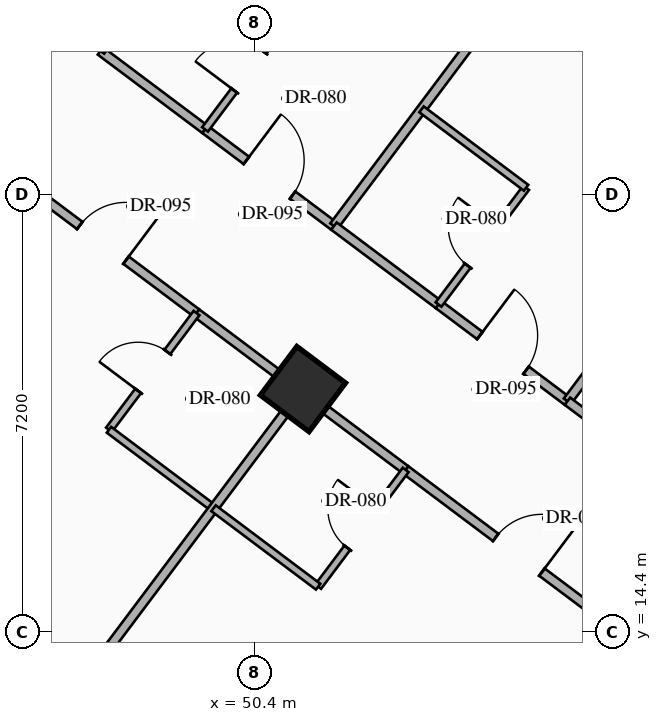
"""IFC4 building model, lengths in metres.
Left out: names, types, materials, properties, quantities, classifications, styles, units other than length and angle.
Written with IfcOpenShell. Run it as: python <this file> out.ifc"""

import sys

from ifc_helpers import new_model, si_unit, direction, frame, frame_2d, origin, origin_2d, place, context, subcontext, project, spatial, rectangle, hollow_rectangle, extrude, element, fill, save


model = new_model("IFC4")
c1 = context("Model", 3, precision=1e-05, world=origin(), true_north=direction((0.0, 1.0)))
c2 = subcontext(c1, "Body", "Model", "MODEL_VIEW")
j1 = project(units=[si_unit("LENGTHUNIT", "METRE"), si_unit("PLANEANGLEUNIT", "RADIAN")], contexts=[c1])
p1 = place(None, origin())
s1 = spatial("IfcSite", under=j1, at=p1, CompositionType="ELEMENT")
p2 = place(p1, origin())
s2 = spatial("IfcBuilding", under=s1, at=p2, CompositionType="ELEMENT")
p3 = place(p2, frame((0.0, 0.0, 36.6)))
s3 = spatial("IfcBuildingStorey", under=s2, at=p3, CompositionType="ELEMENT", Elevation=36.6)
p4 = place(p3, frame((51.2, 18.4, 0.0), z_axis=(0.0, 0.0, 1.0), x_axis=(0.799999996291, -0.600000004945, 0.0)))
e1 = element("IfcColumn", 1, at=p4, inside=s3, PredefinedType="COLUMN", context=c2, shape_type="SweptSolid", body=[
    extrude(hollow_rectangle(XDim=1.0, YDim=1.0, WallThickness=0.038, at=origin_2d()), origin(), (0.0, 0.0, 1.0), 3.35),
])
p5 = place(p3, frame((44.86, 40.73, 0.0), z_axis=(0.0, 0.0, 1.0), x_axis=(0.800006902154, -0.599990797017, 0.0)))
e2 = element("IfcWall", 2, at=p5, inside=s3, PredefinedType="STANDARD", context=c2, shape_type="SweptSolid", body=[
    extrude(rectangle(XDim=29.712, YDim=0.28, at=frame_2d((14.856, 0.0))), origin(), (0.0, 0.0, 1.0), 3.13),
])
p6 = place(p5, frame((14.249, 0.0, 0.0)))
e3 = element("IfcOpeningElement", 3, at=p6, cuts=e2, PredefinedType="OPENING", context=c2, shape_type="SweptSolid", body=[
    extrude(rectangle(XDim=1.1, YDim=2.2, at=frame_2d((0.55, 1.1))), frame((0.0, 0.15, 0.0), z_axis=(0.0, -1.0, 0.0), x_axis=(1.0, 0.0, 0.0)), (0.0, 0.0, 1.0), 0.3),
])
p7 = place(p5, frame((1.612, 0.0, 0.85)))
e4 = element("IfcOpeningElement", 4, at=p7, cuts=e2, PredefinedType="OPENING", context=c2, shape_type="SweptSolid", body=[
    extrude(rectangle(XDim=1.4, YDim=1.8, at=frame_2d((0.7, 0.9))), frame((0.0, 0.15, 0.0), z_axis=(0.0, -1.0, 0.0), x_axis=(1.0, 0.0, 0.0)), (0.0, 0.0, 1.0), 0.3),
])
p8 = place(p5, frame((5.667, 0.0, 0.85)))
e5 = element("IfcOpeningElement", 5, at=p8, cuts=e2, PredefinedType="OPENING", context=c2, shape_type="SweptSolid", body=[
    extrude(rectangle(XDim=1.4, YDim=1.8, at=frame_2d((0.7, 0.9))), frame((0.0, 0.15, 0.0), z_axis=(0.0, -1.0, 0.0), x_axis=(1.0, 0.0, 0.0)), (0.0, 0.0, 1.0), 0.3),
])
p9 = place(p5, frame((9.912, 0.0, 0.85)))
e6 = element("IfcOpeningElement", 6, at=p9, cuts=e2, PredefinedType="OPENING", context=c2, shape_type="SweptSolid", body=[
    extrude(rectangle(XDim=1.4, YDim=1.8, at=frame_2d((0.7, 0.9))), frame((0.0, 0.15, 0.0), z_axis=(0.0, -1.0, 0.0), x_axis=(1.0, 0.0, 0.0)), (0.0, 0.0, 1.0), 0.3),
])
p10 = place(p5, frame((19.528, 0.0, 0.85)))
e7 = element("IfcOpeningElement", 7, at=p10, cuts=e2, PredefinedType="OPENING", context=c2, shape_type="SweptSolid", body=[
    extrude(rectangle(XDim=1.4, YDim=1.8, at=frame_2d((0.7, 0.9))), frame((0.0, 0.15, 0.0), z_axis=(0.0, -1.0, 0.0), x_axis=(1.0, 0.0, 0.0)), (0.0, 0.0, 1.0), 0.3),
])
p11 = place(p5, frame((23.451, 0.0, 0.85)))
e8 = element("IfcOpeningElement", 8, at=p11, cuts=e2, PredefinedType="OPENING", context=c2, shape_type="SweptSolid", body=[
    extrude(rectangle(XDim=1.4, YDim=1.8, at=frame_2d((0.7, 0.9))), frame((0.0, 0.15, 0.0), z_axis=(0.0, -1.0, 0.0), x_axis=(1.0, 0.0, 0.0)), (0.0, 0.0, 1.0), 0.3),
])
p12 = place(p5, frame((27.852, 0.0, 0.85)))
e9 = element("IfcOpeningElement", 9, at=p12, cuts=e2, PredefinedType="OPENING", context=c2, shape_type="SweptSolid", body=[
    extrude(rectangle(XDim=1.4, YDim=1.8, at=frame_2d((0.7, 0.9))), frame((0.0, 0.15, 0.0), z_axis=(0.0, -1.0, 0.0), x_axis=(1.0, 0.0, 0.0)), (0.0, 0.0, 1.0), 0.3),
])
p13 = place(p3, frame((53.318, 2.487, 0.0), z_axis=(0.0, 0.0, 1.0), x_axis=(-0.800004174678, 0.599994433723, 0.0)))
e10 = element("IfcWall", 10, at=p13, inside=s3, PredefinedType="STANDARD", context=c2, shape_type="SweptSolid", body=[
    extrude(rectangle(XDim=35.089, YDim=0.28, at=frame_2d((17.544, 0.0))), origin(), (0.0, 0.0, 1.0), 3.13),
])
p14 = place(p13, frame((1.931, 0.0, 0.85)))
e11 = element("IfcOpeningElement", 11, at=p14, cuts=e10, PredefinedType="OPENING", context=c2, shape_type="SweptSolid", body=[
    extrude(rectangle(XDim=1.4, YDim=1.8, at=frame_2d((0.7, 0.9))), frame((0.0, 0.15, 0.0), z_axis=(0.0, -1.0, 0.0), x_axis=(1.0, 0.0, 0.0)), (0.0, 0.0, 1.0), 0.3),
])
p15 = place(p13, frame((6.819, 0.0, 0.85)))
e12 = element("IfcOpeningElement", 12, at=p15, cuts=e10, PredefinedType="OPENING", context=c2, shape_type="SweptSolid", body=[
    extrude(rectangle(XDim=1.4, YDim=1.8, at=frame_2d((0.7, 0.9))), frame((0.0, 0.15, 0.0), z_axis=(0.0, -1.0, 0.0), x_axis=(1.0, 0.0, 0.0)), (0.0, 0.0, 1.0), 0.3),
])
p16 = place(p13, frame((11.832, 0.0, 0.85)))
e13 = element("IfcOpeningElement", 13, at=p16, cuts=e10, PredefinedType="OPENING", context=c2, shape_type="SweptSolid", body=[
    extrude(rectangle(XDim=1.4, YDim=1.8, at=frame_2d((0.7, 0.9))), frame((0.0, 0.15, 0.0), z_axis=(0.0, -1.0, 0.0), x_axis=(1.0, 0.0, 0.0)), (0.0, 0.0, 1.0), 0.3),
])
p17 = place(p13, frame((17.647, 0.0, 0.85)))
e14 = element("IfcOpeningElement", 14, at=p17, cuts=e10, PredefinedType="OPENING", context=c2, shape_type="SweptSolid", body=[
    extrude(rectangle(XDim=1.4, YDim=1.8, at=frame_2d((0.7, 0.9))), frame((0.0, 0.15, 0.0), z_axis=(0.0, -1.0, 0.0), x_axis=(1.0, 0.0, 0.0)), (0.0, 0.0, 1.0), 0.3),
])
p18 = place(p13, frame((21.857, 0.0, 0.85)))
e15 = element("IfcOpeningElement", 15, at=p18, cuts=e10, PredefinedType="OPENING", context=c2, shape_type="SweptSolid", body=[
    extrude(rectangle(XDim=1.4, YDim=1.8, at=frame_2d((0.7, 0.9))), frame((0.0, 0.15, 0.0), z_axis=(0.0, -1.0, 0.0), x_axis=(1.0, 0.0, 0.0)), (0.0, 0.0, 1.0), 0.3),
])
p19 = place(p13, frame((26.87, 0.0, 0.85)))
e16 = element("IfcOpeningElement", 16, at=p19, cuts=e10, PredefinedType="OPENING", context=c2, shape_type="SweptSolid", body=[
    extrude(rectangle(XDim=1.4, YDim=1.8, at=frame_2d((0.7, 0.9))), frame((0.0, 0.15, 0.0), z_axis=(0.0, -1.0, 0.0), x_axis=(1.0, 0.0, 0.0)), (0.0, 0.0, 1.0), 0.3),
])
p20 = place(p13, frame((31.757, 0.0, 0.85)))
e17 = element("IfcOpeningElement", 17, at=p20, cuts=e10, PredefinedType="OPENING", context=c2, shape_type="SweptSolid", body=[
    extrude(rectangle(XDim=1.4, YDim=1.8, at=frame_2d((0.7, 0.9))), frame((0.0, 0.15, 0.0), z_axis=(0.0, -1.0, 0.0), x_axis=(1.0, 0.0, 0.0)), (0.0, 0.0, 1.0), 0.3),
])
p21 = place(p3, frame((47.87, 23.96, 0.0), z_axis=(0.0, 0.0, 1.0), x_axis=(0.79998637334, -0.60001816845, 0.0)))
e18 = element("IfcWall", 18, at=p21, inside=s3, PredefinedType="PARTITIONING", context=c2, shape_type="SweptSolid", body=[
    extrude(rectangle(XDim=2.15, YDim=0.15, at=frame_2d((1.075, 0.0))), origin(), (0.0, 0.0, 1.0), 2.775),
])
p22 = place(p3, frame((49.59, 22.67, 0.0), z_axis=(0.0, 0.0, 1.0), x_axis=(0.800011056104, -0.599985258246, 0.0)))
e19 = element("IfcWall", 19, at=p22, inside=s3, PredefinedType="PARTITIONING", context=c2, shape_type="SweptSolid", body=[
    extrude(rectangle(XDim=2.65, YDim=0.15, at=frame_2d((1.325, 0.0))), origin(), (0.0, 0.0, 1.0), 2.775),
])
p23 = place(p22, frame((0.85, 0.0, 0.0)))
e20 = element("IfcOpeningElement", 20, at=p23, cuts=e19, PredefinedType="OPENING", context=c2, shape_type="SweptSolid", body=[
    extrude(rectangle(XDim=0.95, YDim=2.15, at=frame_2d((0.475, 1.075))), frame((0.0, 0.085, 0.0), z_axis=(0.0, -1.0, 0.0), x_axis=(1.0, 0.0, 0.0)), (0.0, 0.0, 1.0), 0.17),
])
p24 = place(p3, frame((49.59, 22.67, 0.0), z_axis=(0.0, 0.0, 1.0), x_axis=(0.599951172744, 0.800036618114, 0.0)))
e21 = element("IfcWall", 21, at=p24, inside=s3, PredefinedType="PARTITIONING", context=c2, shape_type="SweptSolid", body=[
    extrude(rectangle(XDim=2.4, YDim=0.12, at=frame_2d((1.2, 0.0))), origin(), (0.0, 0.0, 1.0), 3.13),
])
p25 = place(p24, frame((0.8, 0.0, 0.0)))
e22 = element("IfcOpeningElement", 22, at=p25, cuts=e21, PredefinedType="OPENING", context=c2, shape_type="SweptSolid", body=[
    extrude(rectangle(XDim=0.8, YDim=2.06, at=frame_2d((0.4, 1.03))), frame((0.0, 0.07, 0.0), z_axis=(0.0, -1.0, 0.0), x_axis=(1.0, 0.0, 0.0)), (0.0, 0.0, 1.0), 0.14),
])
for number, where, z_axis, x_axis in (
    (23, (47.87, 23.96, 0.0), (0.0, 0.0, 1.0), (0.6, 0.8, 0.0)),
    (24, (51.71, 21.08, 0.0), (0.0, 0.0, 1.0), (0.6, 0.8, 0.0)),
):
    element("IfcWall", number, at=place(p3, frame(where, z_axis=z_axis, x_axis=x_axis)), inside=s3, PredefinedType="PARTITIONING", context=c2, shape_type="SweptSolid", body=[
        extrude(rectangle(XDim=11.55, YDim=0.15, at=frame_2d((5.775, 0.0))), origin(), (0.0, 0.0, 1.0), 3.13),
    ])
p26 = place(p3, frame((51.71, 21.08, 0.0), z_axis=(0.0, 0.0, 1.0), x_axis=(0.79998637334, -0.60001816845, 0.0)))
e25 = element("IfcWall", 25, at=p26, inside=s3, PredefinedType="PARTITIONING", context=c2, shape_type="SweptSolid", body=[
    extrude(rectangle(XDim=2.15, YDim=0.15, at=frame_2d((1.075, 0.0))), origin(), (0.0, 0.0, 1.0), 2.775),
])
p27 = place(p3, frame((53.43, 19.79, 0.0), z_axis=(0.0, 0.0, 1.0), x_axis=(0.8, -0.6, 0.0)))
e26 = element("IfcWall", 26, at=p27, inside=s3, PredefinedType="PARTITIONING", context=c2, shape_type="SweptSolid", body=[
    extrude(rectangle(XDim=2.65, YDim=0.15, at=frame_2d((1.325, 0.0))), origin(), (0.0, 0.0, 1.0), 2.775),
])
p28 = place(p27, frame((0.85, 0.0, 0.0)))
e27 = element("IfcOpeningElement", 27, at=p28, cuts=e26, PredefinedType="OPENING", context=c2, shape_type="SweptSolid", body=[
    extrude(rectangle(XDim=0.95, YDim=2.15, at=frame_2d((0.475, 1.075))), frame((0.0, 0.085, 0.0), z_axis=(0.0, -1.0, 0.0), x_axis=(1.0, 0.0, 0.0)), (0.0, 0.0, 1.0), 0.17),
])
p29 = place(p3, frame((53.43, 19.79, 0.0), z_axis=(0.0, 0.0, 1.0), x_axis=(0.600065100855, 0.79995117022, 0.0)))
e28 = element("IfcWall", 28, at=p29, inside=s3, PredefinedType="PARTITIONING", context=c2, shape_type="SweptSolid", body=[
    extrude(rectangle(XDim=2.4, YDim=0.12, at=frame_2d((1.2, 0.0))), origin(), (0.0, 0.0, 1.0), 3.13),
])
p30 = place(p29, frame((0.8, 0.0, 0.0)))
e29 = element("IfcOpeningElement", 29, at=p30, cuts=e28, PredefinedType="OPENING", context=c2, shape_type="SweptSolid", body=[
    extrude(rectangle(XDim=0.8, YDim=2.06, at=frame_2d((0.4, 1.03))), frame((0.0, 0.07, 0.0), z_axis=(0.0, -1.0, 0.0), x_axis=(1.0, 0.0, 0.0)), (0.0, 0.0, 1.0), 0.14),
])
p31 = place(p3, frame((53.15, 23.0, 0.0), z_axis=(0.0, 0.0, 1.0), x_axis=(0.800027249606, -0.599963665473, 0.0)))
e30 = element("IfcWall", 30, at=p31, inside=s3, PredefinedType="PARTITIONING", context=c2, shape_type="SweptSolid", body=[
    extrude(rectangle(XDim=2.15, YDim=0.12, at=frame_2d((1.075, 0.0))), origin(), (0.0, 0.0, 1.0), 3.13),
])
p32 = place(p3, frame((55.55, 18.2, 0.0), z_axis=(0.0, 0.0, 1.0), x_axis=(0.599996617946, 0.80000253653, 0.0)))
e31 = element("IfcWall", 31, at=p32, inside=s3, PredefinedType="PARTITIONING", context=c2, shape_type="SweptSolid", body=[
    extrude(rectangle(XDim=11.55, YDim=0.15, at=frame_2d((5.775, 0.0))), origin(), (0.0, 0.0, 1.0), 3.13),
])
p33 = place(p3, frame((55.55, 18.2, 0.0), z_axis=(0.0, 0.0, 1.0), x_axis=(0.79998637334, -0.60001816845, 0.0)))
e32 = element("IfcWall", 32, at=p33, inside=s3, PredefinedType="PARTITIONING", context=c2, shape_type="SweptSolid", body=[
    extrude(rectangle(XDim=2.15, YDim=0.15, at=frame_2d((1.075, 0.0))), origin(), (0.0, 0.0, 1.0), 2.775),
])
p34 = place(p3, frame((46.37, 21.96, 0.0), z_axis=(0.0, 0.0, 1.0), x_axis=(0.799977170108, -0.600030438649, 0.0)))
e33 = element("IfcWall", 33, at=p34, inside=s3, PredefinedType="PARTITIONING", context=c2, shape_type="SweptSolid", body=[
    extrude(rectangle(XDim=3.85, YDim=0.15, at=frame_2d((1.925, 0.0))), origin(), (0.0, 0.0, 1.0), 2.425),
])
p35 = place(p34, frame((1.45, 0.0, 0.0)))
e34 = element("IfcOpeningElement", 34, at=p35, cuts=e33, PredefinedType="OPENING", context=c2, shape_type="SweptSolid", body=[
    extrude(rectangle(XDim=0.95, YDim=2.15, at=frame_2d((0.475, 1.075))), frame((0.0, 0.085, 0.0), z_axis=(0.0, -1.0, 0.0), x_axis=(1.0, 0.0, 0.0)), (0.0, 0.0, 1.0), 0.17),
])
p36 = place(p3, frame((49.45, 19.65, 0.0), z_axis=(0.0, 0.0, 1.0), x_axis=(0.800040880289, -0.59994548908, 0.0)))
e35 = element("IfcWall", 35, at=p36, inside=s3, PredefinedType="PARTITIONING", context=c2, shape_type="SweptSolid", body=[
    extrude(rectangle(XDim=2.15, YDim=0.15, at=frame_2d((1.075, 0.0))), origin(), (0.0, 0.0, 1.0), 2.425),
])
p37 = place(p3, frame((48.01, 17.73, 0.0), z_axis=(0.0, 0.0, 1.0), x_axis=(0.6, 0.8, 0.0)))
e36 = element("IfcWall", 36, at=p37, inside=s3, PredefinedType="PARTITIONING", context=c2, shape_type="SweptSolid", body=[
    extrude(rectangle(XDim=2.4, YDim=0.12, at=frame_2d((1.2, 0.0))), origin(), (0.0, 0.0, 1.0), 3.13),
])
p38 = place(p37, frame((0.8, 0.0, 0.0)))
e37 = element("IfcOpeningElement", 37, at=p38, cuts=e36, PredefinedType="OPENING", context=c2, shape_type="SweptSolid", body=[
    extrude(rectangle(XDim=0.8, YDim=2.06, at=frame_2d((0.4, 1.03))), frame((0.0, 0.07, 0.0), z_axis=(0.0, -1.0, 0.0), x_axis=(1.0, 0.0, 0.0)), (0.0, 0.0, 1.0), 0.14),
])
p39 = place(p3, frame((48.01, 17.73, 0.0), z_axis=(0.0, 0.0, 1.0), x_axis=(0.79998637334, -0.60001816845, 0.0)))
e38 = element("IfcWall", 38, at=p39, inside=s3, PredefinedType="PARTITIONING", context=c2, shape_type="SweptSolid", body=[
    extrude(rectangle(XDim=2.15, YDim=0.12, at=frame_2d((1.075, 0.0))), origin(), (0.0, 0.0, 1.0), 3.13),
])
p40 = place(p3, frame((44.36, 9.28, 0.0), z_axis=(0.0, 0.0, 1.0), x_axis=(0.599986233332, 0.800010324816, 0.0)))
e39 = element("IfcWall", 39, at=p40, inside=s3, PredefinedType="PARTITIONING", context=c2, shape_type="SweptSolid", body=[
    extrude(rectangle(XDim=11.35, YDim=0.15, at=frame_2d((5.675, 0.0))), origin(), (0.0, 0.0, 1.0), 2.425),
])
p41 = place(p3, frame((51.17, 18.36, 0.0), z_axis=(0.0, 0.0, 1.0), x_axis=(0.79998637334, -0.60001816845, 0.0)))
e40 = element("IfcWall", 40, at=p41, inside=s3, PredefinedType="PARTITIONING", context=c2, shape_type="SweptSolid", body=[
    extrude(rectangle(XDim=2.15, YDim=0.15, at=frame_2d((1.075, 0.0))), origin(), (0.0, 0.0, 1.0), 2.425),
])
p42 = place(p3, frame((52.89, 17.07, 0.0), z_axis=(0.0, 0.0, 1.0), x_axis=(0.800012600101, -0.599983199498, 0.0)))
e41 = element("IfcWall", 41, at=p42, inside=s3, PredefinedType="PARTITIONING", context=c2, shape_type="SweptSolid", body=[
    extrude(rectangle(XDim=4.65, YDim=0.15, at=frame_2d((2.325, 0.0))), origin(), (0.0, 0.0, 1.0), 2.425),
])
p43 = place(p42, frame((1.85, 0.0, 0.0)))
e42 = element("IfcOpeningElement", 42, at=p43, cuts=e41, PredefinedType="OPENING", context=c2, shape_type="SweptSolid", body=[
    extrude(rectangle(XDim=0.95, YDim=2.15, at=frame_2d((0.475, 1.075))), frame((0.0, 0.085, 0.0), z_axis=(0.0, -1.0, 0.0), x_axis=(1.0, 0.0, 0.0)), (0.0, 0.0, 1.0), 0.17),
])
p44 = place(p3, frame((51.45, 15.15, 0.0), z_axis=(0.0, 0.0, 1.0), x_axis=(0.599951172744, 0.800036618114, 0.0)))
e43 = element("IfcWall", 43, at=p44, inside=s3, PredefinedType="PARTITIONING", context=c2, shape_type="SweptSolid", body=[
    extrude(rectangle(XDim=2.4, YDim=0.12, at=frame_2d((1.2, 0.0))), origin(), (0.0, 0.0, 1.0), 3.13),
])
p45 = place(p44, frame((0.8, 0.0, 0.0)))
e44 = element("IfcOpeningElement", 44, at=p45, cuts=e43, PredefinedType="OPENING", context=c2, shape_type="SweptSolid", body=[
    extrude(rectangle(XDim=0.8, YDim=2.06, at=frame_2d((0.4, 1.03))), frame((0.0, 0.07, 0.0), z_axis=(0.0, -1.0, 0.0), x_axis=(1.0, 0.0, 0.0)), (0.0, 0.0, 1.0), 0.14),
])
p46 = place(p3, frame((49.73, 16.44, 0.0), z_axis=(0.0, 0.0, 1.0), x_axis=(0.79998637334, -0.60001816845, 0.0)))
e45 = element("IfcWall", 45, at=p46, inside=s3, PredefinedType="PARTITIONING", context=c2, shape_type="SweptSolid", body=[
    extrude(rectangle(XDim=2.15, YDim=0.12, at=frame_2d((1.075, 0.0))), origin(), (0.0, 0.0, 1.0), 3.13),
])
p47 = place(p3, frame((49.8, 5.2, 0.0), z_axis=(0.0, 0.0, 1.0), x_axis=(0.6, 0.8, 0.0)))
e46 = element("IfcWall", 46, at=p47, inside=s3, PredefinedType="PARTITIONING", context=c2, shape_type="SweptSolid", body=[
    extrude(rectangle(XDim=11.35, YDim=0.15, at=frame_2d((5.675, 0.0))), origin(), (0.0, 0.0, 1.0), 3.13),
])
p48 = place(p23, origin())
e47 = element("IfcDoor", 47, at=p48, inside=s3, OperationType="SINGLE_SWING_LEFT", PredefinedType="DOOR", context=c2, shape_type="SweptSolid", body=[
    extrude(rectangle(XDim=0.95, YDim=2.15, at=frame_2d((0.475, 1.075))), frame((0.0, 0.025, 0.0), z_axis=(0.0, -1.0, 0.0), x_axis=(1.0, 0.0, 0.0)), (0.0, 0.0, 1.0), 0.05),
])
fill(e20, e47)
p49 = place(p25, origin())
e48 = element("IfcDoor", 48, at=p49, inside=s3, OperationType="SINGLE_SWING_LEFT", PredefinedType="DOOR", context=c2, shape_type="SweptSolid", body=[
    extrude(rectangle(XDim=0.8, YDim=2.06, at=frame_2d((0.4, 1.03))), frame((0.0, 0.025, 0.0), z_axis=(0.0, -1.0, 0.0), x_axis=(1.0, 0.0, 0.0)), (0.0, 0.0, 1.0), 0.05),
])
fill(e22, e48)
p50 = place(p28, origin())
e49 = element("IfcDoor", 49, at=p50, inside=s3, OperationType="SINGLE_SWING_LEFT", PredefinedType="DOOR", context=c2, shape_type="SweptSolid", body=[
    extrude(rectangle(XDim=0.95, YDim=2.15, at=frame_2d((0.475, 1.075))), frame((0.0, 0.025, 0.0), z_axis=(0.0, -1.0, 0.0), x_axis=(1.0, 0.0, 0.0)), (0.0, 0.0, 1.0), 0.05),
])
fill(e27, e49)
p51 = place(p30, origin())
e50 = element("IfcDoor", 50, at=p51, inside=s3, OperationType="SINGLE_SWING_RIGHT", PredefinedType="DOOR", context=c2, shape_type="SweptSolid", body=[
    extrude(rectangle(XDim=0.8, YDim=2.06, at=frame_2d((0.4, 1.03))), frame((0.0, 0.025, 0.0), z_axis=(0.0, -1.0, 0.0), x_axis=(1.0, 0.0, 0.0)), (0.0, 0.0, 1.0), 0.05),
])
fill(e29, e50)
p52 = place(p35, origin())
e51 = element("IfcDoor", 51, at=p52, inside=s3, OperationType="SINGLE_SWING_RIGHT", PredefinedType="DOOR", context=c2, shape_type="SweptSolid", body=[
    extrude(rectangle(XDim=0.95, YDim=2.15, at=frame_2d((0.475, 1.075))), frame((0.0, 0.025, 0.0), z_axis=(0.0, -1.0, 0.0), x_axis=(1.0, 0.0, 0.0)), (0.0, 0.0, 1.0), 0.05),
])
fill(e34, e51)
p53 = place(p38, origin())
e52 = element("IfcDoor", 52, at=p53, inside=s3, OperationType="SINGLE_SWING_LEFT", PredefinedType="DOOR", context=c2, shape_type="SweptSolid", body=[
    extrude(rectangle(XDim=0.8, YDim=2.06, at=frame_2d((0.4, 1.03))), frame((0.0, 0.025, 0.0), z_axis=(0.0, -1.0, 0.0), x_axis=(1.0, 0.0, 0.0)), (0.0, 0.0, 1.0), 0.05),
])
fill(e37, e52)
p54 = place(p43, origin())
e53 = element("IfcDoor", 53, at=p54, inside=s3, OperationType="SINGLE_SWING_RIGHT", PredefinedType="DOOR", context=c2, shape_type="SweptSolid", body=[
    extrude(rectangle(XDim=0.95, YDim=2.15, at=frame_2d((0.475, 1.075))), frame((0.0, 0.025, 0.0), z_axis=(0.0, -1.0, 0.0), x_axis=(1.0, 0.0, 0.0)), (0.0, 0.0, 1.0), 0.05),
])
fill(e42, e53)
p55 = place(p45, origin())
e54 = element("IfcDoor", 54, at=p55, inside=s3, OperationType="SINGLE_SWING_RIGHT", PredefinedType="DOOR", context=c2, shape_type="SweptSolid", body=[
    extrude(rectangle(XDim=0.8, YDim=2.06, at=frame_2d((0.4, 1.03))), frame((0.0, 0.025, 0.0), z_axis=(0.0, -1.0, 0.0), x_axis=(1.0, 0.0, 0.0)), (0.0, 0.0, 1.0), 0.05),
])
fill(e44, e54)
save(model, sys.argv[1])
